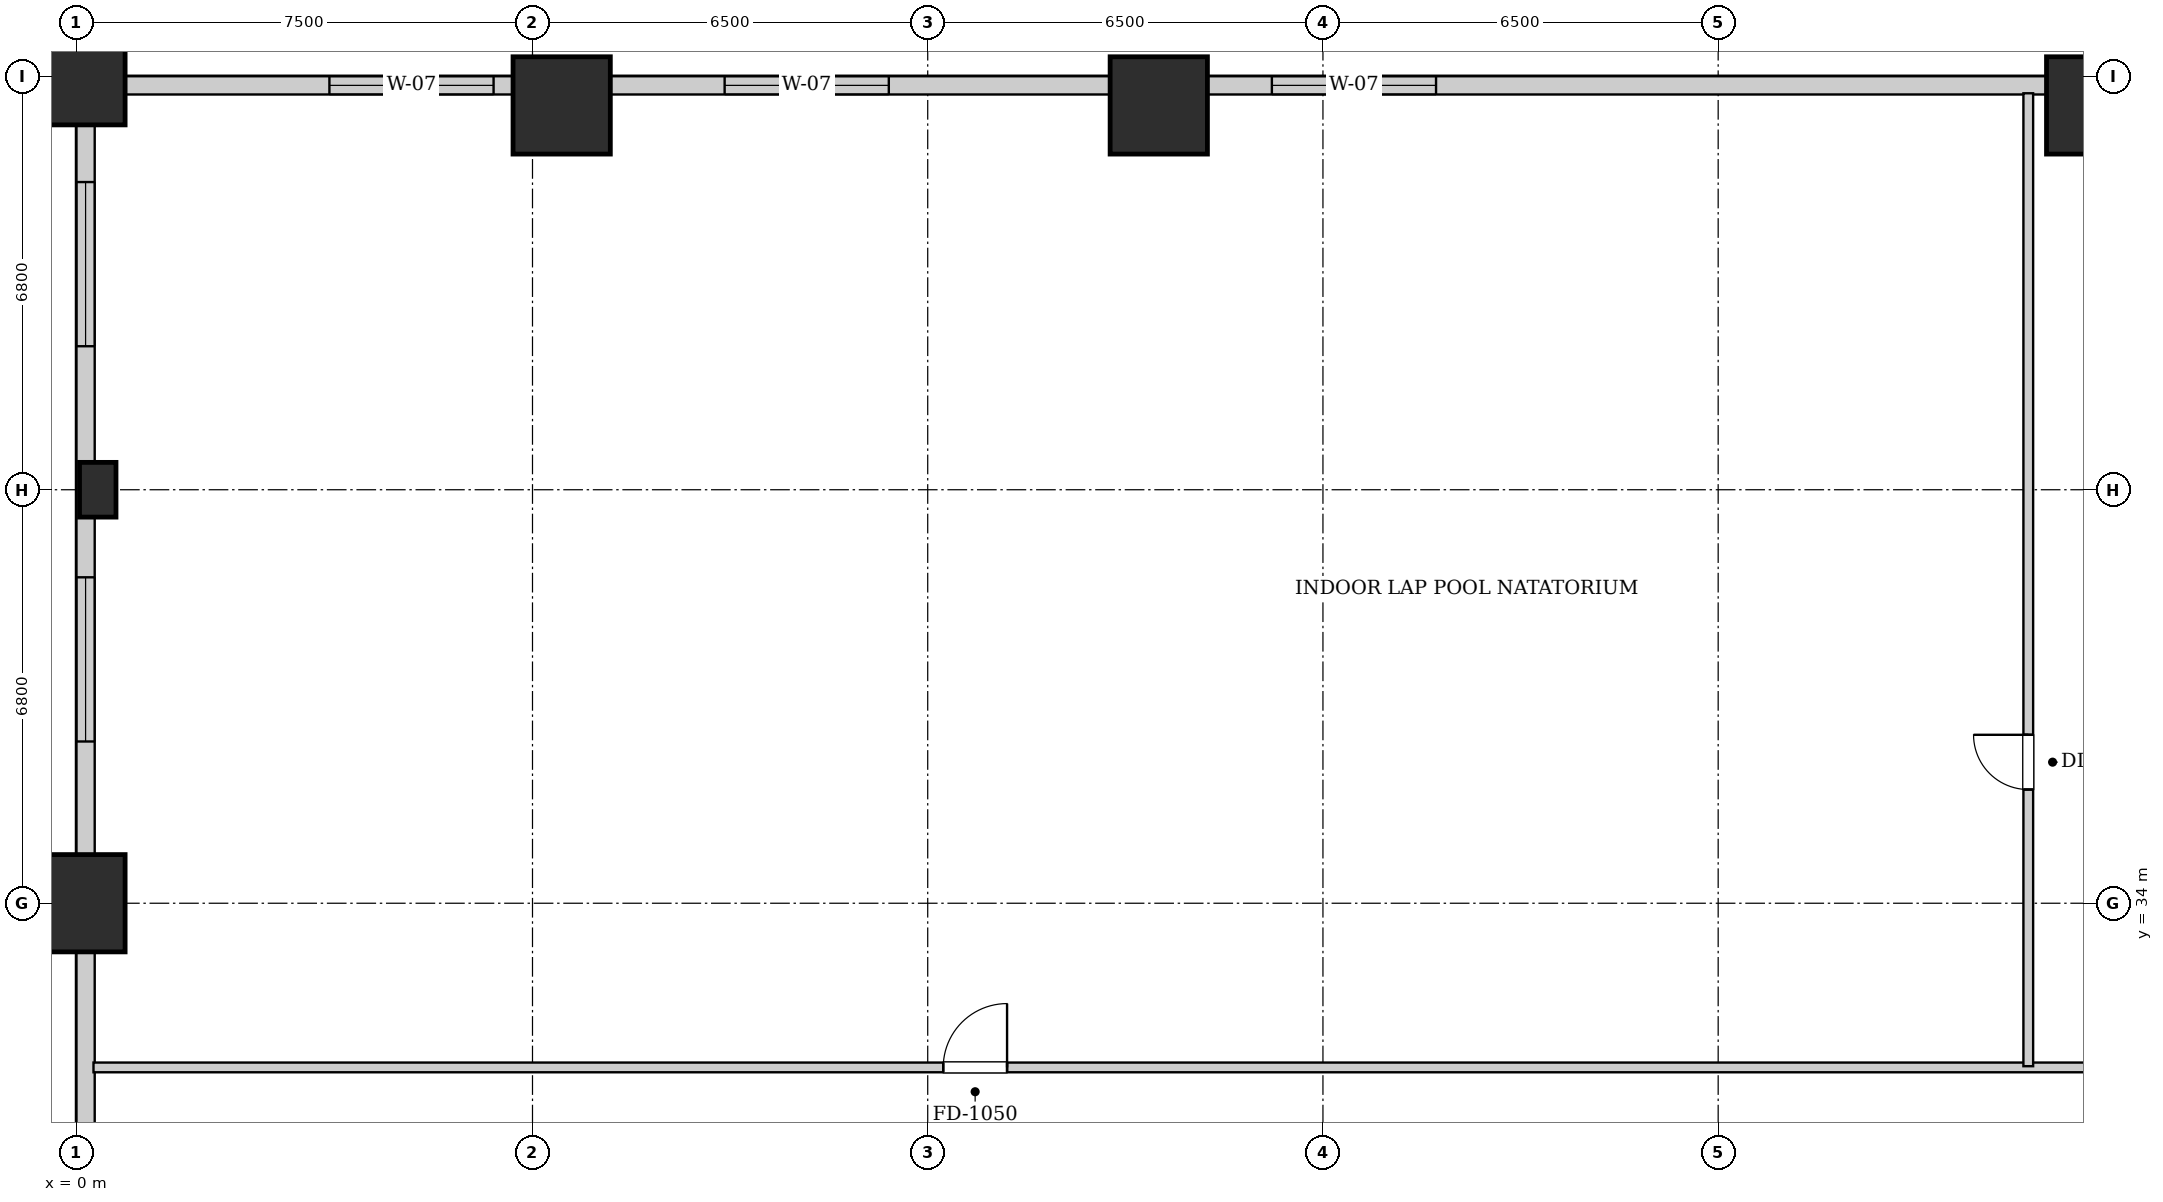
"""IFC4 building model, lengths in metres.
Left out: names, types, materials, properties, quantities, classifications, styles, units other than length and angle.
Written with IfcOpenShell. Run it as: python <this file> out.ifc"""

import sys

from ifc_helpers import new_model, si_unit, direction, frame, frame_2d, origin, origin_2d, place, context, subcontext, project, spatial, rectangle, extrude, element, fill, save


model = new_model("IFC4")
c1 = context("Model", 3, precision=1e-05, world=origin(), true_north=direction((0.0, 1.0)))
c2 = subcontext(c1, "Body", "Model", "MODEL_VIEW")
j1 = project(units=[si_unit("LENGTHUNIT", "METRE"), si_unit("PLANEANGLEUNIT", "RADIAN")], contexts=[c1])
p1 = place(None, origin())
s1 = spatial("IfcSite", under=j1, at=p1, CompositionType="ELEMENT")
p2 = place(p1, origin())
s2 = spatial("IfcBuilding", under=s1, at=p2, CompositionType="ELEMENT")
p3 = place(p2, frame((0.0, 0.0, 16.0)))
s3 = spatial("IfcBuildingStorey", under=s2, at=p3, CompositionType="ELEMENT", Elevation=16.0)
for number, where, z_axis, x_axis in (
    (1, (0.0, 34.0, 0.0), (0.0, 0.0, 1.0), (1.0, 0.0, 0.0)),
    (2, (0.0, 47.6, 0.0), (0.0, 0.0, 1.0), (1.0, 0.0, 0.0)),
    (3, (7.98, 47.12, 0.0), (0.0, 0.0, 1.0), (1.0, 0.0, 0.0)),
    (4, (17.8, 47.12, 0.0), (0.0, 0.0, 1.0), (1.0, 0.0, 0.0)),
    (5, (33.2, 47.12, 0.0), (0.0, 0.0, 1.0), (1.0, 0.0, 0.0)),
):
    element("IfcColumn", number, at=place(p3, frame(where, z_axis=z_axis, x_axis=x_axis)), inside=s3, PredefinedType="COLUMN", context=c2, shape_type="SweptSolid", body=[
        extrude(rectangle(XDim=1.6, YDim=1.6, at=origin_2d()), origin(), (0.0, 0.0, 1.0), 4.8),
    ])
p4 = place(p3, frame((0.35, 40.8, 0.0), z_axis=(0.0, 0.0, 1.0), x_axis=(1.0, 0.0, 0.0)))
e6 = element("IfcColumn", 6, at=p4, inside=s3, PredefinedType="PILASTER", context=c2, shape_type="SweptSolid", body=[
    extrude(rectangle(XDim=0.6, YDim=0.9, at=origin_2d()), origin(), (0.0, 0.0, 1.0), 4.8),
])
p5 = place(p3, frame((0.16, 47.45, 0.0), z_axis=(0.0, 0.0, 1.0), x_axis=(1.0, 0.0, 0.0)))
e7 = element("IfcWall", 7, at=p5, inside=s3, PredefinedType="SOLIDWALL", context=c2, shape_type="SweptSolid", body=[
    extrude(rectangle(XDim=53.68, YDim=0.3, at=frame_2d((26.84, 0.0))), origin(), (0.0, 0.0, 1.0), 3.235),
])
p6 = place(p5, frame((4.0, 0.0, 0.9)))
e8 = element("IfcOpeningElement", 8, at=p6, cuts=e7, PredefinedType="OPENING", context=c2, shape_type="SweptSolid", body=[
    extrude(rectangle(XDim=2.7, YDim=2.1, at=frame_2d((1.35, 1.05))), frame((0.0, 0.16, 0.0), z_axis=(0.0, -1.0, 0.0), x_axis=(1.0, 0.0, 0.0)), (0.0, 0.0, 1.0), 0.32),
])
p7 = place(p5, frame((10.5, 0.0, 0.9)))
e9 = element("IfcOpeningElement", 9, at=p7, cuts=e7, PredefinedType="OPENING", context=c2, shape_type="SweptSolid", body=[
    extrude(rectangle(XDim=2.7, YDim=2.1, at=frame_2d((1.35, 1.05))), frame((0.0, 0.16, 0.0), z_axis=(0.0, -1.0, 0.0), x_axis=(1.0, 0.0, 0.0)), (0.0, 0.0, 1.0), 0.32),
])
p8 = place(p5, frame((19.5, 0.0, 0.9)))
e10 = element("IfcOpeningElement", 10, at=p8, cuts=e7, PredefinedType="OPENING", context=c2, shape_type="SweptSolid", body=[
    extrude(rectangle(XDim=2.7, YDim=2.1, at=frame_2d((1.35, 1.05))), frame((0.0, 0.16, 0.0), z_axis=(0.0, -1.0, 0.0), x_axis=(1.0, 0.0, 0.0)), (0.0, 0.0, 1.0), 0.32),
])
p9 = place(p5, frame((36.5, 0.0, 0.9)))
e11 = element("IfcOpeningElement", 11, at=p9, cuts=e7, PredefinedType="OPENING", context=c2, shape_type="SweptSolid", body=[
    extrude(rectangle(XDim=2.7, YDim=2.1, at=frame_2d((1.35, 1.05))), frame((0.0, 0.16, 0.0), z_axis=(0.0, -1.0, 0.0), x_axis=(1.0, 0.0, 0.0)), (0.0, 0.0, 1.0), 0.32),
])
p10 = place(p5, frame((42.2, 0.0, 0.9)))
e12 = element("IfcOpeningElement", 12, at=p10, cuts=e7, PredefinedType="OPENING", context=c2, shape_type="SweptSolid", body=[
    extrude(rectangle(XDim=2.7, YDim=2.1, at=frame_2d((1.35, 1.05))), frame((0.0, 0.16, 0.0), z_axis=(0.0, -1.0, 0.0), x_axis=(1.0, 0.0, 0.0)), (0.0, 0.0, 1.0), 0.32),
])
p11 = place(p3, frame((0.15, 0.16, 0.0), z_axis=(0.0, 0.0, 1.0), x_axis=(0.0, 1.0, 0.0)))
e13 = element("IfcWall", 13, at=p11, inside=s3, PredefinedType="SOLIDWALL", context=c2, shape_type="SweptSolid", body=[
    extrude(rectangle(XDim=47.28, YDim=0.3, at=frame_2d((23.64, 0.0))), origin(), (0.0, 0.0, 1.0), 3.235),
])
p12 = place(p11, frame((3.33, 0.0, 0.9)))
e14 = element("IfcOpeningElement", 14, at=p12, cuts=e13, PredefinedType="OPENING", context=c2, shape_type="SweptSolid", body=[
    extrude(rectangle(XDim=2.7, YDim=2.1, at=frame_2d((1.35, 1.05))), frame((0.0, 0.16, 0.0), z_axis=(0.0, -1.0, 0.0), x_axis=(1.0, 0.0, 0.0)), (0.0, 0.0, 1.0), 0.32),
])
p13 = place(p11, frame((9.34, 0.0, 0.9)))
e15 = element("IfcOpeningElement", 15, at=p13, cuts=e13, PredefinedType="OPENING", context=c2, shape_type="SweptSolid", body=[
    extrude(rectangle(XDim=2.7, YDim=2.1, at=frame_2d((1.35, 1.05))), frame((0.0, 0.16, 0.0), z_axis=(0.0, -1.0, 0.0), x_axis=(1.0, 0.0, 0.0)), (0.0, 0.0, 1.0), 0.32),
])
p14 = place(p11, frame((17.18, 0.0, 0.85)))
e16 = element("IfcOpeningElement", 16, at=p14, cuts=e13, PredefinedType="OPENING", context=c2, shape_type="SweptSolid", body=[
    extrude(rectangle(XDim=2.1, YDim=1.85, at=frame_2d((1.05, 0.925))), frame((0.0, 0.16, 0.0), z_axis=(0.0, -1.0, 0.0), x_axis=(1.0, 0.0, 0.0)), (0.0, 0.0, 1.0), 0.32),
])
p15 = place(p11, frame((36.5, 0.0, 0.9)))
e17 = element("IfcOpeningElement", 17, at=p15, cuts=e13, PredefinedType="OPENING", context=c2, shape_type="SweptSolid", body=[
    extrude(rectangle(XDim=2.7, YDim=2.1, at=frame_2d((1.35, 1.05))), frame((0.0, 0.16, 0.0), z_axis=(0.0, -1.0, 0.0), x_axis=(1.0, 0.0, 0.0)), (0.0, 0.0, 1.0), 0.32),
])
p16 = place(p11, frame((43.0, 0.0, 0.9)))
e18 = element("IfcOpeningElement", 18, at=p16, cuts=e13, PredefinedType="OPENING", context=c2, shape_type="SweptSolid", body=[
    extrude(rectangle(XDim=2.7, YDim=2.1, at=frame_2d((1.35, 1.05))), frame((0.0, 0.16, 0.0), z_axis=(0.0, -1.0, 0.0), x_axis=(1.0, 0.0, 0.0)), (0.0, 0.0, 1.0), 0.32),
])
p17 = place(p3, frame((0.28, 31.3, 0.0), z_axis=(0.0, 0.0, 1.0), x_axis=(1.0, 0.0, 0.0)))
e19 = element("IfcWall", 19, at=p17, inside=s3, PredefinedType="PARTITIONING", context=c2, shape_type="SweptSolid", body=[
    extrude(rectangle(XDim=53.44, YDim=0.16, at=frame_2d((26.72, 0.0))), origin(), (0.0, 0.0, 1.0), 4.35),
])
p18 = place(p17, frame((13.975, 0.0, 0.0)))
e20 = element("IfcOpeningElement", 20, at=p18, cuts=e19, PredefinedType="OPENING", context=c2, shape_type="SweptSolid", body=[
    extrude(rectangle(XDim=1.05, YDim=2.05, at=frame_2d((0.525, 1.025))), frame((0.0, 0.09, 0.0), z_axis=(0.0, -1.0, 0.0), x_axis=(1.0, 0.0, 0.0)), (0.0, 0.0, 1.0), 0.18),
])
p19 = place(p17, frame((34.475, 0.0, 0.0)))
e21 = element("IfcOpeningElement", 21, at=p19, cuts=e19, PredefinedType="OPENING", context=c2, shape_type="SweptSolid", body=[
    extrude(rectangle(XDim=1.05, YDim=2.05, at=frame_2d((0.525, 1.025))), frame((0.0, 0.09, 0.0), z_axis=(0.0, -1.0, 0.0), x_axis=(1.0, 0.0, 0.0)), (0.0, 0.0, 1.0), 0.18),
])
p20 = place(p3, frame((32.1, 31.32, 0.0), z_axis=(0.0, 0.0, 1.0), x_axis=(0.0, 1.0, 0.0)))
e22 = element("IfcWall", 22, at=p20, inside=s3, PredefinedType="PARTITIONING", context=c2, shape_type="SweptSolid", body=[
    extrude(rectangle(XDim=16.0, YDim=0.16, at=frame_2d((8.0, 0.0))), origin(), (0.0, 0.0, 1.0), 4.35),
])
p21 = place(p20, frame((4.55, 0.0, 0.0)))
e23 = element("IfcOpeningElement", 23, at=p21, cuts=e22, PredefinedType="OPENING", context=c2, shape_type="SweptSolid", body=[
    extrude(rectangle(XDim=0.9, YDim=2.05, at=frame_2d((0.45, 1.025))), frame((0.0, 0.09, 0.0), z_axis=(0.0, -1.0, 0.0), x_axis=(1.0, 0.0, 0.0)), (0.0, 0.0, 1.0), 0.18),
])
p22 = place(p18, origin())
e24 = element("IfcDoor", 24, at=p22, inside=s3, OperationType="SINGLE_SWING_RIGHT", PredefinedType="DOOR", context=c2, shape_type="SweptSolid", body=[
    extrude(rectangle(XDim=1.05, YDim=2.05, at=frame_2d((0.525, 1.025))), frame((0.0, 0.025, 0.0), z_axis=(0.0, -1.0, 0.0), x_axis=(1.0, 0.0, 0.0)), (0.0, 0.0, 1.0), 0.05),
])
fill(e20, e24)
p23 = place(p21, origin())
e25 = element("IfcDoor", 25, at=p23, inside=s3, OperationType="SINGLE_SWING_RIGHT", PredefinedType="DOOR", context=c2, shape_type="SweptSolid", body=[
    extrude(rectangle(XDim=0.9, YDim=2.05, at=frame_2d((0.45, 1.025))), frame((0.0, 0.025, 0.0), z_axis=(0.0, -1.0, 0.0), x_axis=(1.0, 0.0, 0.0)), (0.0, 0.0, 1.0), 0.05),
])
fill(e23, e25)
p24 = place(p6, origin())
e26 = element("IfcWindow", 26, at=p24, inside=s3, PartitioningType="TRIPLE_PANEL_VERTICAL", PredefinedType="WINDOW", context=c2, shape_type="SweptSolid", body=[
    extrude(rectangle(XDim=2.7, YDim=2.1, at=frame_2d((1.35, 1.05))), frame((0.0, 0.03, 0.0), z_axis=(0.0, -1.0, 0.0), x_axis=(1.0, 0.0, 0.0)), (0.0, 0.0, 1.0), 0.06),
])
fill(e8, e26)
p25 = place(p7, origin())
e27 = element("IfcWindow", 27, at=p25, inside=s3, PartitioningType="TRIPLE_PANEL_VERTICAL", PredefinedType="WINDOW", context=c2, shape_type="SweptSolid", body=[
    extrude(rectangle(XDim=2.7, YDim=2.1, at=frame_2d((1.35, 1.05))), frame((0.0, 0.03, 0.0), z_axis=(0.0, -1.0, 0.0), x_axis=(1.0, 0.0, 0.0)), (0.0, 0.0, 1.0), 0.06),
])
fill(e9, e27)
p26 = place(p8, origin())
e28 = element("IfcWindow", 28, at=p26, inside=s3, PartitioningType="TRIPLE_PANEL_VERTICAL", PredefinedType="WINDOW", context=c2, shape_type="SweptSolid", body=[
    extrude(rectangle(XDim=2.7, YDim=2.1, at=frame_2d((1.35, 1.05))), frame((0.0, 0.03, 0.0), z_axis=(0.0, -1.0, 0.0), x_axis=(1.0, 0.0, 0.0)), (0.0, 0.0, 1.0), 0.06),
])
fill(e10, e28)
p27 = place(p15, origin())
e29 = element("IfcWindow", 29, at=p27, inside=s3, PartitioningType="TRIPLE_PANEL_VERTICAL", PredefinedType="WINDOW", context=c2, shape_type="SweptSolid", body=[
    extrude(rectangle(XDim=2.7, YDim=2.1, at=frame_2d((1.35, 1.05))), frame((0.0, 0.03, 0.0), z_axis=(0.0, -1.0, 0.0), x_axis=(1.0, 0.0, 0.0)), (0.0, 0.0, 1.0), 0.06),
])
fill(e17, e29)
p28 = place(p16, origin())
e30 = element("IfcWindow", 30, at=p28, inside=s3, PartitioningType="TRIPLE_PANEL_VERTICAL", PredefinedType="WINDOW", context=c2, shape_type="SweptSolid", body=[
    extrude(rectangle(XDim=2.7, YDim=2.1, at=frame_2d((1.35, 1.05))), frame((0.0, 0.03, 0.0), z_axis=(0.0, -1.0, 0.0), x_axis=(1.0, 0.0, 0.0)), (0.0, 0.0, 1.0), 0.06),
])
fill(e18, e30)
save(model, sys.argv[1])
